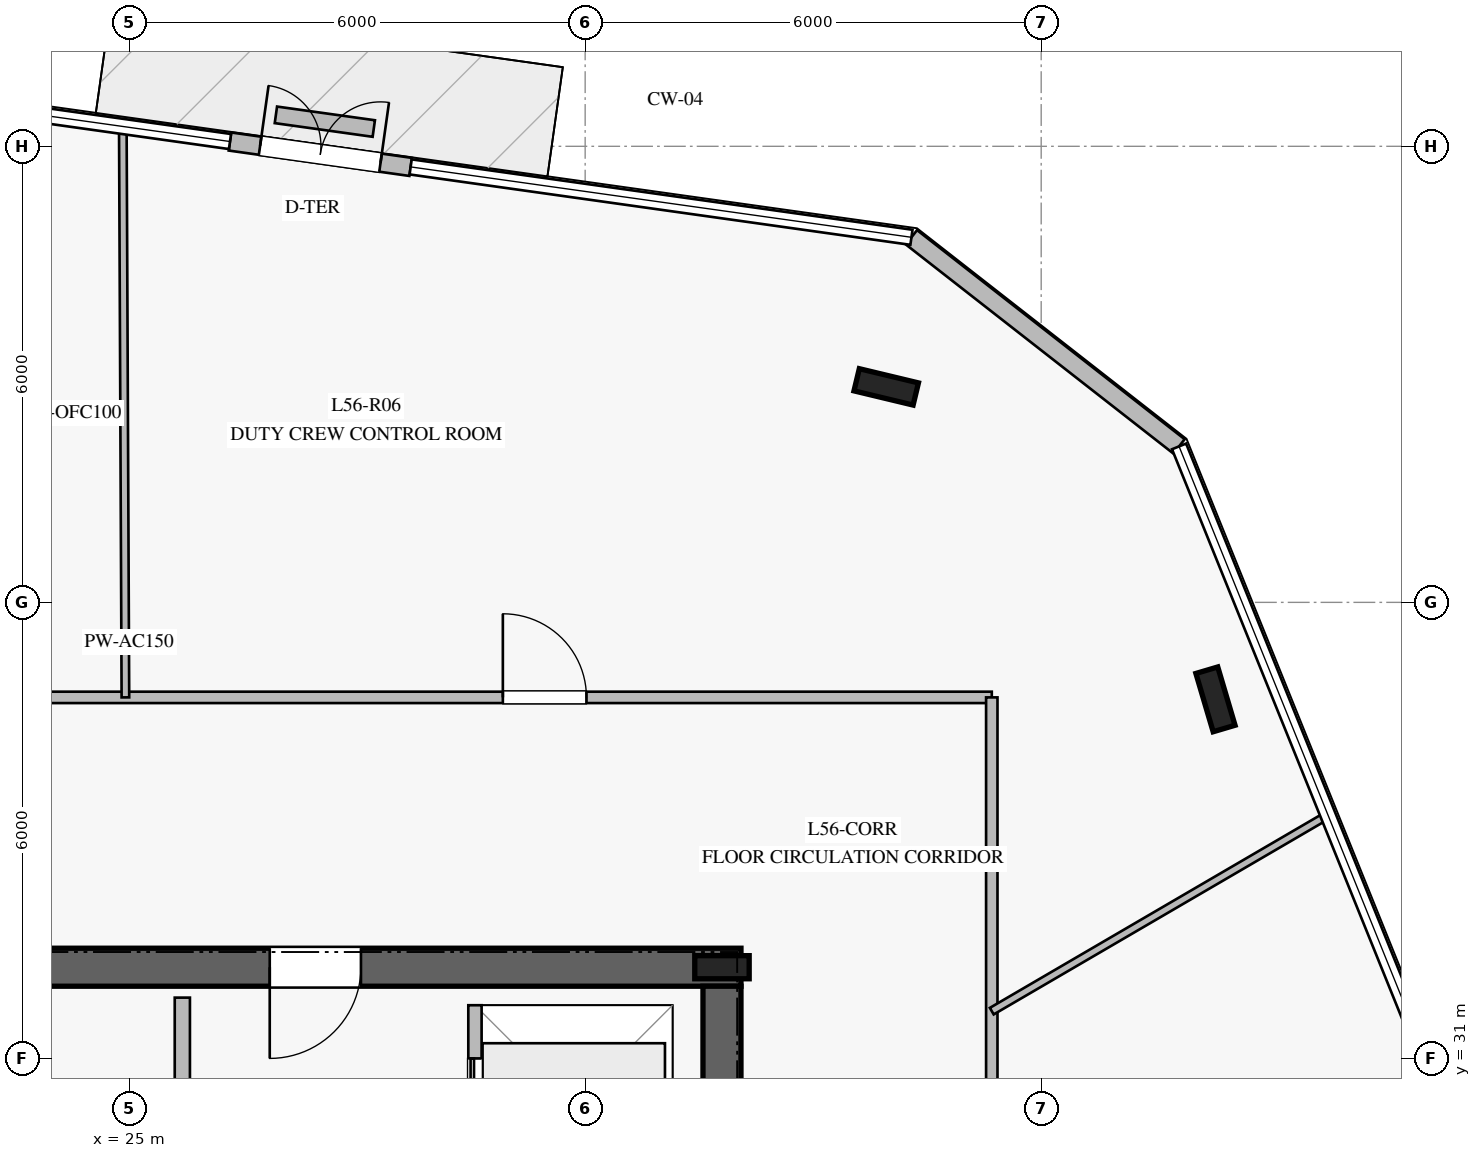
"""IFC4 building model, lengths in metres.
Left out: names, types, materials, properties, quantities, classifications, styles, units other than length and angle.
Written with IfcOpenShell. Run it as: python <this file> out.ifc"""

import sys

from ifc_helpers import new_model, si_unit, direction, frame, frame_2d, origin, origin_2d, place, context, subcontext, project, spatial, rectangle, i_section, extrude, element, fill, save


model = new_model("IFC4")
c1 = context("Model", 3, precision=1e-05, world=origin(), true_north=direction((0.0, 1.0)))
c2 = subcontext(c1, "Body", "Model", "MODEL_VIEW")
j1 = project(units=[si_unit("LENGTHUNIT", "METRE"), si_unit("PLANEANGLEUNIT", "RADIAN")], contexts=[c1])
p1 = place(None, origin())
s1 = spatial("IfcSite", under=j1, at=p1, CompositionType="ELEMENT")
p2 = place(p1, origin())
s2 = spatial("IfcBuilding", under=s1, at=p2, CompositionType="ELEMENT")
p3 = place(p2, frame((0.0, 0.0, 232.8)))
s3 = spatial("IfcBuildingStorey", under=s2, at=p3, CompositionType="ELEMENT", Elevation=232.8)
p4 = place(p3, frame((33.05, 32.2, 0.0), z_axis=(0.0, 0.0, 1.0), x_axis=(-1.0, 0.0, 0.0)))
e1 = element("IfcWall", 1, at=p4, inside=s3, PredefinedType="SHEAR", context=c2, shape_type="SweptSolid", body=[
    extrude(rectangle(XDim=16.1, YDim=0.5, at=frame_2d((8.05, 0.0))), origin(), (0.0, 0.0, 1.0), 3.78),
])
p5 = place(p4, frame((5.0, 0.0, 0.0)))
e2 = element("IfcOpeningElement", 2, at=p5, cuts=e1, PredefinedType="OPENING", context=c2, shape_type="SweptSolid", body=[
    extrude(rectangle(XDim=1.2, YDim=2.25, at=frame_2d((0.6, 1.125))), frame((0.0, 0.26, 0.0), z_axis=(0.0, -1.0, 0.0), x_axis=(1.0, 0.0, 0.0)), (0.0, 0.0, 1.0), 0.52),
])
p6 = place(p4, frame((9.825, 0.0, 0.0)))
e3 = element("IfcOpeningElement", 3, at=p6, cuts=e1, PredefinedType="OPENING", context=c2, shape_type="SweptSolid", body=[
    extrude(rectangle(XDim=1.1, YDim=2.2, at=frame_2d((0.55, 1.1))), frame((0.0, 0.26, 0.0), z_axis=(0.0, -1.0, 0.0), x_axis=(1.0, 0.0, 0.0)), (0.0, 0.0, 1.0), 0.52),
])
p7 = place(p3, frame((32.8, 18.05, 0.0), z_axis=(0.0, 0.0, 1.0), x_axis=(0.0, 1.0, 0.0)))
e4 = element("IfcWall", 4, at=p7, inside=s3, PredefinedType="SHEAR", context=c2, shape_type="SweptSolid", body=[
    extrude(rectangle(XDim=13.9, YDim=0.5, at=frame_2d((6.95, 0.0))), origin(), (0.0, 0.0, 1.0), 3.78),
])
p8 = place(p3, frame((32.8, 32.2, 0.0), z_axis=(0.0, 0.0, 1.0), x_axis=(1.0, 0.0, 0.0)))
e5 = element("IfcColumn", 5, at=p8, inside=s3, PredefinedType="COLUMN", context=c2, shape_type="SweptSolid", body=[
    extrude(i_section(OverallWidth=0.304, OverallDepth=0.716, WebThickness=0.021, FlangeThickness=0.04, at=origin_2d()), origin(), (0.0, 0.0, 1.0), 4.0),
])
for number, where, z_axis, x_axis in (
    (6, (34.961, 39.835, 0.0), (0.0, 0.0, 1.0), (-0.972, 0.233, 0.0)),
    (7, (39.293, 35.724, 0.0), (0.0, 0.0, 1.0), (-0.284, 0.959, 0.0)),
):
    element("IfcColumn", number, at=place(p3, frame(where, z_axis=z_axis, x_axis=x_axis)), inside=s3, PredefinedType="COLUMN", context=c2, shape_type="SweptSolid", body=[
        extrude(i_section(OverallWidth=0.3, OverallDepth=0.8, WebThickness=0.018, FlangeThickness=0.033, at=origin_2d()), origin(), (0.0, 0.0, 1.0), 4.0),
    ])
p9 = place(p3, frame((28.704, 42.729, 0.0), z_axis=(0.0, 0.0, 1.0), x_axis=(-0.990274320591, 0.139128609486, 0.0)))
e8 = element("IfcWall", 8, at=p9, inside=s3, PredefinedType="STANDARD", context=c2, shape_type="SweptSolid", body=[
    extrude(rectangle(XDim=2.401, YDim=0.24, at=frame_2d((1.2, 0.0))), origin(), (0.0, 0.0, 1.0), 3.78),
])
p10 = place(p9, frame((0.4, 0.0, 0.0)))
e9 = element("IfcOpeningElement", 9, at=p10, cuts=e8, PredefinedType="OPENING", context=c2, shape_type="SweptSolid", body=[
    extrude(rectangle(XDim=1.6, YDim=2.25, at=frame_2d((0.8, 1.125))), frame((0.0, 0.13, 0.0), z_axis=(0.0, -1.0, 0.0), x_axis=(1.0, 0.0, 0.0)), (0.0, 0.0, 1.0), 0.26),
])
p11 = place(p3, frame((38.814, 39.052, 0.0), z_axis=(0.0, 0.0, 1.0), x_axis=(-0.788002835757, 0.615671609577, 0.0)))
e10 = element("IfcWall", 10, at=p11, inside=s3, PredefinedType="STANDARD", context=c2, shape_type="SweptSolid", body=[
    extrude(rectangle(XDim=4.468, YDim=0.24, at=frame_2d((2.234, 0.0))), origin(), (0.0, 0.0, 1.0), 3.78),
])
p12 = place(p3, frame((28.219, 43.234, 0.0), z_axis=(0.0, 0.0, 1.0), x_axis=(-0.990358235174, 0.138530018491, 0.0)))
e11 = element("IfcWall", 11, at=p12, inside=s3, PredefinedType="USERDEFINED", context=c2, shape_type="SweptSolid", body=[
    extrude(rectangle(XDim=1.301, YDim=0.22, at=frame_2d((0.65, 0.0))), origin(), (0.0, 0.0, 1.0), 0.4),
])
p13 = place(p3, frame((25.7, 26.65, 0.0), z_axis=(0.0, 0.0, 1.0), x_axis=(0.0, 1.0, 0.0)))
e12 = element("IfcWall", 12, at=p13, inside=s3, PredefinedType="PARTITIONING", context=c2, shape_type="SweptSolid", body=[
    extrude(rectangle(XDim=5.15, YDim=0.2, at=frame_2d((2.575, 0.0))), origin(), (0.0, 0.0, 1.0), 3.78),
])
p14 = place(p3, frame((29.55, 29.1, 0.0), z_axis=(0.0, 0.0, 1.0), x_axis=(0.0, 1.0, 0.0)))
e13 = element("IfcWall", 13, at=p14, inside=s3, PredefinedType="PARTITIONING", context=c2, shape_type="SweptSolid", body=[
    extrude(rectangle(XDim=2.6, YDim=0.175, at=frame_2d((1.3, 0.0))), origin(), (0.0, 0.0, 1.0), 3.78),
])
p15 = place(p14, frame((0.7, 0.0, 0.0)))
e14 = element("IfcOpeningElement", 14, at=p15, cuts=e13, PredefinedType="OPENING", context=c2, shape_type="SweptSolid", body=[
    extrude(rectangle(XDim=1.2, YDim=2.2, at=frame_2d((0.6, 1.1))), frame((0.0, 0.098, 0.0), z_axis=(0.0, -1.0, 0.0), x_axis=(1.0, 0.0, 0.0)), (0.0, 0.0, 1.0), 0.195),
])
p16 = place(p3, frame((13.65, 35.75, 0.0), z_axis=(0.0, 0.0, 1.0), x_axis=(1.0, 0.0, 0.0)))
e15 = element("IfcWall", 15, at=p16, inside=s3, PredefinedType="PARTITIONING", context=c2, shape_type="SweptSolid", body=[
    extrude(rectangle(XDim=22.7, YDim=0.15, at=frame_2d((11.35, 0.0))), origin(), (0.0, 0.0, 1.0), 3.05),
])
p17 = place(p16, frame((16.267, 0.0, 0.0)))
e16 = element("IfcOpeningElement", 16, at=p17, cuts=e15, PredefinedType="OPENING", context=c2, shape_type="SweptSolid", body=[
    extrude(rectangle(XDim=1.1, YDim=2.2, at=frame_2d((0.55, 1.1))), frame((0.0, 0.085, 0.0), z_axis=(0.0, -1.0, 0.0), x_axis=(1.0, 0.0, 0.0)), (0.0, 0.0, 1.0), 0.17),
])
p18 = place(p16, frame((6.271, 0.0, 0.0)))
e17 = element("IfcOpeningElement", 17, at=p18, cuts=e15, PredefinedType="OPENING", context=c2, shape_type="SweptSolid", body=[
    extrude(rectangle(XDim=1.1, YDim=2.2, at=frame_2d((0.55, 1.1))), frame((0.0, 0.085, 0.0), z_axis=(0.0, -1.0, 0.0), x_axis=(1.0, 0.0, 0.0)), (0.0, 0.0, 1.0), 0.17),
])
p19 = place(p16, frame((0.481, 0.0, 0.0)))
e18 = element("IfcOpeningElement", 18, at=p19, cuts=e15, PredefinedType="OPENING", context=c2, shape_type="SweptSolid", body=[
    extrude(rectangle(XDim=1.1, YDim=2.2, at=frame_2d((0.55, 1.1))), frame((0.0, 0.085, 0.0), z_axis=(0.0, -1.0, 0.0), x_axis=(1.0, 0.0, 0.0)), (0.0, 0.0, 1.0), 0.17),
])
p20 = place(p3, frame((36.35, 35.75, 0.0), z_axis=(0.0, 0.0, 1.0), x_axis=(0.0, -1.0, 0.0)))
e19 = element("IfcWall", 19, at=p20, inside=s3, PredefinedType="PARTITIONING", context=c2, shape_type="SweptSolid", body=[
    extrude(rectangle(XDim=21.5, YDim=0.15, at=frame_2d((10.75, 0.0))), origin(), (0.0, 0.0, 1.0), 3.05),
])
p21 = place(p20, frame((18.147, 0.0, 0.0)))
e20 = element("IfcOpeningElement", 20, at=p21, cuts=e19, PredefinedType="OPENING", context=c2, shape_type="SweptSolid", body=[
    extrude(rectangle(XDim=1.1, YDim=2.2, at=frame_2d((0.55, 1.1))), frame((0.0, 0.085, 0.0), z_axis=(0.0, -1.0, 0.0), x_axis=(1.0, 0.0, 0.0)), (0.0, 0.0, 1.0), 0.17),
])
p22 = place(p20, frame((9.62, 0.0, 0.0)))
e21 = element("IfcOpeningElement", 21, at=p22, cuts=e19, PredefinedType="OPENING", context=c2, shape_type="SweptSolid", body=[
    extrude(rectangle(XDim=1.1, YDim=2.2, at=frame_2d((0.55, 1.1))), frame((0.0, 0.085, 0.0), z_axis=(0.0, -1.0, 0.0), x_axis=(1.0, 0.0, 0.0)), (0.0, 0.0, 1.0), 0.17),
])
p23 = place(p3, frame((24.951, 35.75, 0.0), z_axis=(0.0, 0.0, 1.0), x_axis=(-0.004528378394, 0.999989746842, 0.0)))
e22 = element("IfcWall", 22, at=p23, inside=s3, PredefinedType="MOVABLE", context=c2, shape_type="SweptSolid", body=[
    extrude(rectangle(XDim=7.494, YDim=0.1, at=frame_2d((3.747, 0.0))), origin(), (0.0, 0.0, 1.0), 3.18),
])
p24 = place(p3, frame((36.35, 31.622, 0.0), z_axis=(0.0, 0.0, 1.0), x_axis=(0.863766757212, 0.503891842695, 0.0)))
e23 = element("IfcWall", 23, at=p24, inside=s3, PredefinedType="MOVABLE", context=c2, shape_type="SweptSolid", body=[
    extrude(rectangle(XDim=5.104, YDim=0.1, at=frame_2d((2.552, 0.0))), origin(), (0.0, 0.0, 1.0), 3.18),
])
p25 = place(p10, frame((1.6, 0.0, 0.0), z_axis=(0.0, 0.0, 1.0), x_axis=(-1.0, 0.0, 0.0)))
e24 = element("IfcDoor", 24, at=p25, inside=s3, OperationType="DOUBLE_DOOR_SINGLE_SWING", PredefinedType="DOOR", context=c2, shape_type="SweptSolid", body=[
    extrude(rectangle(XDim=1.6, YDim=2.25, at=frame_2d((0.8, 1.125))), frame((0.0, 0.025, 0.0), z_axis=(0.0, -1.0, 0.0), x_axis=(1.0, 0.0, 0.0)), (0.0, 0.0, 1.0), 0.05),
])
fill(e9, e24)
p26 = place(p5, origin())
e25 = element("IfcDoor", 25, at=p26, inside=s3, OperationType="SINGLE_SWING_RIGHT", PredefinedType="DOOR", context=c2, shape_type="SweptSolid", body=[
    extrude(rectangle(XDim=1.2, YDim=2.25, at=frame_2d((0.6, 1.125))), frame((0.0, 0.025, 0.0), z_axis=(0.0, -1.0, 0.0), x_axis=(1.0, 0.0, 0.0)), (0.0, 0.0, 1.0), 0.05),
])
fill(e2, e25)
p27 = place(p15, origin())
e26 = element("IfcDoor", 26, at=p27, inside=s3, OperationType="DOUBLE_DOOR_SLIDING", PredefinedType="DOOR", context=c2, shape_type="SweptSolid", body=[
    extrude(rectangle(XDim=1.2, YDim=2.2, at=frame_2d((0.6, 1.1))), frame((0.0, 0.025, 0.0), z_axis=(0.0, -1.0, 0.0), x_axis=(1.0, 0.0, 0.0)), (0.0, 0.0, 1.0), 0.05),
])
fill(e14, e26)
p28 = place(p17, origin())
e27 = element("IfcDoor", 27, at=p28, inside=s3, OperationType="SINGLE_SWING_LEFT", PredefinedType="DOOR", context=c2, shape_type="SweptSolid", body=[
    extrude(rectangle(XDim=1.1, YDim=2.2, at=frame_2d((0.55, 1.1))), frame((0.0, 0.025, 0.0), z_axis=(0.0, -1.0, 0.0), x_axis=(1.0, 0.0, 0.0)), (0.0, 0.0, 1.0), 0.05),
])
fill(e16, e27)
save(model, sys.argv[1])
